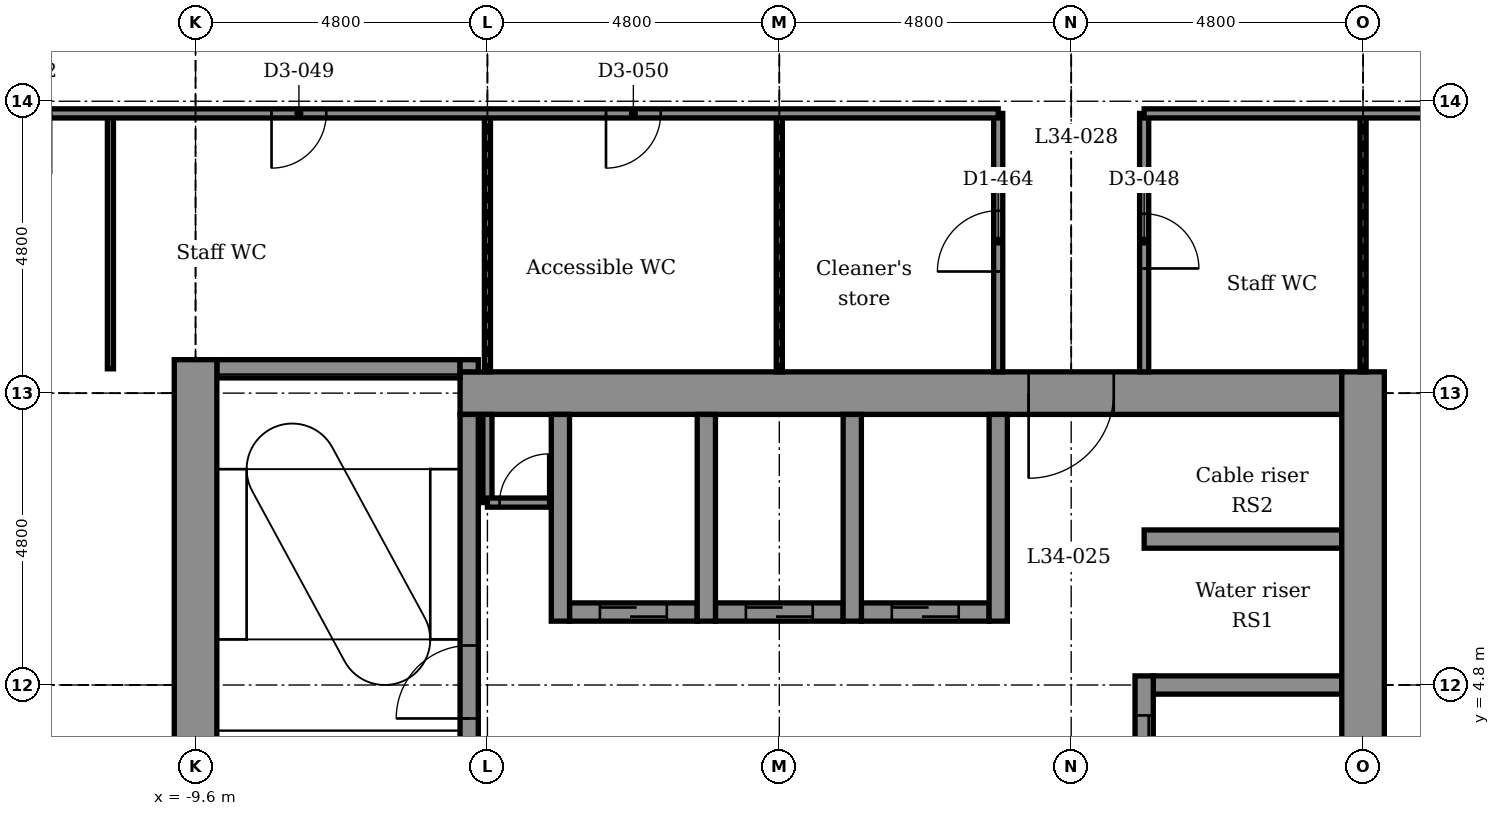
"""IFC4 building model, lengths in metres.
Left out: names, types, materials, properties, quantities, classifications, styles, units other than length and angle.
Written with IfcOpenShell. Run it as: python <this file> out.ifc"""

import sys

from ifc_helpers import new_model, si_unit, direction, frame, frame_2d, origin, place, context, subcontext, project, spatial, rectangle, extrude, element, fill, save


model = new_model("IFC4")
c1 = context("Model", 3, precision=1e-05, world=origin(), true_north=direction((0.0, 1.0)))
c2 = subcontext(c1, "Body", "Model", "MODEL_VIEW")
j1 = project(units=[si_unit("LENGTHUNIT", "METRE"), si_unit("PLANEANGLEUNIT", "RADIAN")], contexts=[c1])
p1 = place(None, origin())
s1 = spatial("IfcSite", under=j1, at=p1, CompositionType="ELEMENT")
p2 = place(p1, origin())
s2 = spatial("IfcBuilding", under=s1, at=p2, CompositionType="ELEMENT")
p3 = place(p2, frame((0.0, 0.0, 166.1)))
s3 = spatial("IfcBuildingStorey", under=s2, at=p3, CompositionType="ELEMENT", Elevation=166.1)
p4 = place(p3, frame((6.15, 4.8, -0.15), z_axis=(0.0, 0.0, 1.0), x_axis=(1.0, 0.0, 0.0)))
e1 = element("IfcWall", 1, at=p4, inside=s3, PredefinedType="STANDARD", context=c2, shape_type="SweptSolid", body=[
    extrude(rectangle(XDim=3.1, YDim=0.3, at=frame_2d((1.55, 0.0))), origin(), (0.0, 0.0, 1.0), 3.9),
])
p5 = place(p3, frame((-3.45, 6.0, -0.15), z_axis=(0.0, 0.0, 1.0), x_axis=(1.0, 0.0, 0.0)))
e2 = element("IfcWall", 2, at=p5, inside=s3, PredefinedType="STANDARD", context=c2, shape_type="SweptSolid", body=[
    extrude(rectangle(XDim=2.1, YDim=0.3, at=frame_2d((1.05, 0.0))), origin(), (0.0, 0.0, 1.0), 3.9),
])
p6 = place(p5, frame((0.5, 0.0, 0.15)))
e3 = element("IfcOpeningElement", 3, at=p6, cuts=e2, PredefinedType="OPENING", context=c2, shape_type="SweptSolid", body=[
    extrude(rectangle(XDim=1.1, YDim=2.1, at=frame_2d((0.55, 1.05))), frame((0.0, 0.16, 0.0), z_axis=(0.0, -1.0, 0.0), x_axis=(1.0, 0.0, 0.0)), (0.0, 0.0, 1.0), 0.32),
])
p7 = place(p3, frame((-1.05, 6.0, -0.15), z_axis=(0.0, 0.0, 1.0), x_axis=(1.0, 0.0, 0.0)))
e4 = element("IfcWall", 4, at=p7, inside=s3, PredefinedType="STANDARD", context=c2, shape_type="SweptSolid", body=[
    extrude(rectangle(XDim=2.1, YDim=0.3, at=frame_2d((1.05, 0.0))), origin(), (0.0, 0.0, 1.0), 3.9),
])
p8 = place(p7, frame((0.5, 0.0, 0.15)))
e5 = element("IfcOpeningElement", 5, at=p8, cuts=e4, PredefinedType="OPENING", context=c2, shape_type="SweptSolid", body=[
    extrude(rectangle(XDim=1.1, YDim=2.1, at=frame_2d((0.55, 1.05))), frame((0.0, 0.16, 0.0), z_axis=(0.0, -1.0, 0.0), x_axis=(1.0, 0.0, 0.0)), (0.0, 0.0, 1.0), 0.32),
])
p9 = place(p3, frame((1.35, 6.0, -0.15), z_axis=(0.0, 0.0, 1.0), x_axis=(1.0, 0.0, 0.0)))
e6 = element("IfcWall", 6, at=p9, inside=s3, PredefinedType="STANDARD", context=c2, shape_type="SweptSolid", body=[
    extrude(rectangle(XDim=2.1, YDim=0.3, at=frame_2d((1.05, 0.0))), origin(), (0.0, 0.0, 1.0), 3.9),
])
p10 = place(p9, frame((0.5, 0.0, 0.15)))
e7 = element("IfcOpeningElement", 7, at=p10, cuts=e6, PredefinedType="OPENING", context=c2, shape_type="SweptSolid", body=[
    extrude(rectangle(XDim=1.1, YDim=2.1, at=frame_2d((0.55, 1.05))), frame((0.0, 0.16, 0.0), z_axis=(0.0, -1.0, 0.0), x_axis=(1.0, 0.0, 0.0)), (0.0, 0.0, 1.0), 0.32),
])
p11 = place(p3, frame((6.0, 7.2, -0.15), z_axis=(0.0, 0.0, 1.0), x_axis=(1.0, 0.0, 0.0)))
e8 = element("IfcWall", 8, at=p11, inside=s3, PredefinedType="STANDARD", context=c2, shape_type="SweptSolid", body=[
    extrude(rectangle(XDim=3.25, YDim=0.3, at=frame_2d((1.625, 0.0))), origin(), (0.0, 0.0, 1.0), 3.9),
])
p12 = place(p3, frame((-5.25, 9.6, -0.15), z_axis=(0.0, 0.0, 1.0), x_axis=(1.0, 0.0, 0.0)))
e9 = element("IfcWall", 9, at=p12, inside=s3, PredefinedType="SHEAR", context=c2, shape_type="SweptSolid", body=[
    extrude(rectangle(XDim=14.5, YDim=0.7, at=frame_2d((7.25, 0.0))), origin(), (0.0, 0.0, 1.0), 3.9),
])
p13 = place(p12, frame((9.35, 0.0, 0.15)))
e10 = element("IfcOpeningElement", 10, at=p13, cuts=e9, PredefinedType="OPENING", context=c2, shape_type="SweptSolid", body=[
    extrude(rectangle(XDim=1.4, YDim=2.1, at=frame_2d((0.7, 1.05))), frame((0.0, 0.36, 0.0), z_axis=(0.0, -1.0, 0.0), x_axis=(1.0, 0.0, 0.0)), (0.0, 0.0, 1.0), 0.72),
])
p14 = place(p3, frame((-9.25, 10.0, -0.15), z_axis=(0.0, 0.0, 1.0), x_axis=(1.0, 0.0, 0.0)))
e11 = element("IfcWall", 11, at=p14, inside=s3, PredefinedType="STANDARD", context=c2, shape_type="SweptSolid", body=[
    extrude(rectangle(XDim=4.0, YDim=0.3, at=frame_2d((2.0, 0.0))), origin(), (0.0, 0.0, 1.0), 3.9),
])
p15 = place(p3, frame((-9.6, 2.55, -0.15), z_axis=(0.0, 0.0, 1.0), x_axis=(0.0, 1.0, 0.0)))
e12 = element("IfcWall", 12, at=p15, inside=s3, PredefinedType="SHEAR", context=c2, shape_type="SweptSolid", body=[
    extrude(rectangle(XDim=7.6, YDim=0.7, at=frame_2d((3.8, 0.0))), origin(), (0.0, 0.0, 1.0), 3.9),
])
p16 = place(p3, frame((-5.1, 2.25, -0.15), z_axis=(0.0, 0.0, 1.0), x_axis=(0.0, 1.0, 0.0)))
e13 = element("IfcWall", 13, at=p16, inside=s3, PredefinedType="STANDARD", context=c2, shape_type="SweptSolid", body=[
    extrude(rectangle(XDim=7.0, YDim=0.3, at=frame_2d((3.5, 0.0))), origin(), (0.0, 0.0, 1.0), 3.9),
])
p17 = place(p16, frame((2.0, 0.0, 0.15)))
e14 = element("IfcOpeningElement", 14, at=p17, cuts=e13, PredefinedType="OPENING", context=c2, shape_type="SweptSolid", body=[
    extrude(rectangle(XDim=1.2, YDim=2.1, at=frame_2d((0.6, 1.05))), frame((0.0, 0.16, 0.0), z_axis=(0.0, -1.0, 0.0), x_axis=(1.0, 0.0, 0.0)), (0.0, 0.0, 1.0), 0.32),
])
p18 = place(p3, frame((-5.1, 9.95, -0.15), z_axis=(0.0, 0.0, 1.0), x_axis=(0.0, 1.0, 0.0)))
e15 = element("IfcWall", 15, at=p18, inside=s3, PredefinedType="STANDARD", context=c2, shape_type="SweptSolid", body=[
    extrude(rectangle(XDim=0.2, YDim=0.3, at=frame_2d((0.1, 0.0))), origin(), (0.0, 0.0, 1.0), 3.9),
])
for number, where, z_axis, x_axis in (
    (16, (-3.6, 5.85, -0.15), (0.0, 0.0, 1.0), (0.0, 1.0, 0.0)),
    (17, (-1.2, 5.85, -0.15), (0.0, 0.0, 1.0), (0.0, 1.0, 0.0)),
    (18, (1.2, 5.85, -0.15), (0.0, 0.0, 1.0), (0.0, 1.0, 0.0)),
    (19, (3.6, 5.85, -0.15), (0.0, 0.0, 1.0), (0.0, 1.0, 0.0)),
):
    element("IfcWall", number, at=place(p3, frame(where, z_axis=z_axis, x_axis=x_axis)), inside=s3, PredefinedType="STANDARD", context=c2, shape_type="SweptSolid", body=[
        extrude(rectangle(XDim=3.4, YDim=0.3, at=frame_2d((1.7, 0.0))), origin(), (0.0, 0.0, 1.0), 3.9),
    ])
p19 = place(p3, frame((6.0, -2.55, -0.15), z_axis=(0.0, 0.0, 1.0), x_axis=(0.0, 1.0, 0.0)))
e20 = element("IfcWall", 20, at=p19, inside=s3, PredefinedType="STANDARD", context=c2, shape_type="SweptSolid", body=[
    extrude(rectangle(XDim=7.5, YDim=0.3, at=frame_2d((3.75, 0.0))), origin(), (0.0, 0.0, 1.0), 3.9),
])
p20 = place(p19, frame((0.65, 0.0, 0.15)))
e21 = element("IfcOpeningElement", 21, at=p20, cuts=e20, PredefinedType="OPENING", context=c2, shape_type="SweptSolid", body=[
    extrude(rectangle(XDim=1.4, YDim=2.1, at=frame_2d((0.7, 1.05))), frame((0.0, 0.16, 0.0), z_axis=(0.0, -1.0, 0.0), x_axis=(1.0, 0.0, 0.0)), (0.0, 0.0, 1.0), 0.32),
])
p21 = place(p19, frame((3.05, 0.0, 0.15)))
e22 = element("IfcOpeningElement", 22, at=p21, cuts=e20, PredefinedType="OPENING", context=c2, shape_type="SweptSolid", body=[
    extrude(rectangle(XDim=1.4, YDim=2.1, at=frame_2d((0.7, 1.05))), frame((0.0, 0.16, 0.0), z_axis=(0.0, -1.0, 0.0), x_axis=(1.0, 0.0, 0.0)), (0.0, 0.0, 1.0), 0.32),
])
p22 = place(p19, frame((5.45, 0.0, 0.15)))
e23 = element("IfcOpeningElement", 23, at=p22, cuts=e20, PredefinedType="OPENING", context=c2, shape_type="SweptSolid", body=[
    extrude(rectangle(XDim=1.4, YDim=2.1, at=frame_2d((0.7, 1.05))), frame((0.0, 0.16, 0.0), z_axis=(0.0, -1.0, 0.0), x_axis=(1.0, 0.0, 0.0)), (0.0, 0.0, 1.0), 0.32),
])
p23 = place(p3, frame((9.6, -10.15, -0.15), z_axis=(0.0, 0.0, 1.0), x_axis=(0.0, 1.0, 0.0)))
e24 = element("IfcWall", 24, at=p23, inside=s3, PredefinedType="SHEAR", context=c2, shape_type="SweptSolid", body=[
    extrude(rectangle(XDim=20.1, YDim=0.7, at=frame_2d((10.05, 0.0))), origin(), (0.0, 0.0, 1.0), 3.9),
])
p24 = place(p3, frame((9.6, 9.95, 0.0), z_axis=(0.0, 0.0, 1.0), x_axis=(0.0, 1.0, 0.0)))
e25 = element("IfcWall", 25, at=p24, inside=s3, PredefinedType="PARTITIONING", context=c2, shape_type="SweptSolid", body=[
    extrude(rectangle(XDim=4.25, YDim=0.1, at=frame_2d((2.125, 0.0))), origin(), (0.0, 0.0, 1.0), 3.066),
])
p25 = place(p3, frame((6.0, 9.95, 0.0), z_axis=(0.0, 0.0, 1.0), x_axis=(0.0, 1.0, 0.0)))
e26 = element("IfcWall", 26, at=p25, inside=s3, PredefinedType="PARTITIONING", context=c2, shape_type="SweptSolid", body=[
    extrude(rectangle(XDim=4.25, YDim=0.15, at=frame_2d((2.125, 0.0))), origin(), (0.0, 0.0, 1.0), 3.75),
])
p26 = place(p25, frame((1.7, 0.0, 0.0)))
e27 = element("IfcOpeningElement", 27, at=p26, cuts=e26, PredefinedType="OPENING", context=c2, shape_type="SweptSolid", body=[
    extrude(rectangle(XDim=0.9, YDim=2.1, at=frame_2d((0.45, 1.05))), frame((0.0, 0.085, 0.0), z_axis=(0.0, -1.0, 0.0), x_axis=(1.0, 0.0, 0.0)), (0.0, 0.0, 1.0), 0.17),
])
p27 = place(p3, frame((3.6, 9.95, 0.0), z_axis=(0.0, 0.0, 1.0), x_axis=(0.0, 1.0, 0.0)))
e28 = element("IfcWall", 28, at=p27, inside=s3, PredefinedType="PARTITIONING", context=c2, shape_type="SweptSolid", body=[
    extrude(rectangle(XDim=4.25, YDim=0.15, at=frame_2d((2.125, 0.0))), origin(), (0.0, 0.0, 1.0), 3.75),
])
p28 = place(p27, frame((1.65, 0.0, 0.0)))
e29 = element("IfcOpeningElement", 29, at=p28, cuts=e28, PredefinedType="OPENING", context=c2, shape_type="SweptSolid", body=[
    extrude(rectangle(XDim=1.0, YDim=2.1, at=frame_2d((0.5, 1.05))), frame((0.0, 0.085, 0.0), z_axis=(0.0, -1.0, 0.0), x_axis=(1.0, 0.0, 0.0)), (0.0, 0.0, 1.0), 0.17),
])
for number, where, z_axis, x_axis in (
    (30, (0.0, 9.95, 0.0), (0.0, 0.0, 1.0), (0.0, 1.0, 0.0)),
    (31, (-4.8, 9.95, 0.0), (0.0, 0.0, 1.0), (0.0, 1.0, 0.0)),
):
    element("IfcWall", number, at=place(p3, frame(where, z_axis=z_axis, x_axis=x_axis)), inside=s3, PredefinedType="PARTITIONING", context=c2, shape_type="SweptSolid", body=[
        extrude(rectangle(XDim=4.25, YDim=0.1, at=frame_2d((2.125, 0.0))), origin(), (0.0, 0.0, 1.0), 3.066),
    ])
p29 = place(p3, frame((-4.8, 7.8, 0.0), z_axis=(0.0, 0.0, 1.0), x_axis=(0.0, 1.0, 0.0)))
e32 = element("IfcWall", 32, at=p29, inside=s3, PredefinedType="PARTITIONING", context=c2, shape_type="SweptSolid", body=[
    extrude(rectangle(XDim=1.45, YDim=0.15, at=frame_2d((0.725, 0.0))), origin(), (0.0, 0.0, 1.0), 3.75),
])
p30 = place(p3, frame((-11.0, 10.0, 0.0), z_axis=(0.0, 0.0, 1.0), x_axis=(0.0, 1.0, 0.0)))
e33 = element("IfcWall", 33, at=p30, inside=s3, PredefinedType="PARTITIONING", context=c2, shape_type="SweptSolid", body=[
    extrude(rectangle(XDim=4.2, YDim=0.1, at=frame_2d((2.1, 0.0))), origin(), (0.0, 0.0, 1.0), 3.75),
])
p31 = place(p3, frame((-4.8, 7.8, 0.0), z_axis=(0.0, 0.0, 1.0), x_axis=(1.0, 0.0, 0.0)))
e34 = element("IfcWall", 34, at=p31, inside=s3, PredefinedType="PARTITIONING", context=c2, shape_type="SweptSolid", body=[
    extrude(rectangle(XDim=1.05, YDim=0.15, at=frame_2d((0.525, 0.0))), origin(), (0.0, 0.0, 1.0), 3.75),
])
p32 = place(p31, frame((0.2, 0.0, 0.0)))
e35 = element("IfcOpeningElement", 35, at=p32, cuts=e34, PredefinedType="OPENING", context=c2, shape_type="SweptSolid", body=[
    extrude(rectangle(XDim=0.8, YDim=2.1, at=frame_2d((0.4, 1.05))), frame((0.0, 0.085, 0.0), z_axis=(0.0, -1.0, 0.0), x_axis=(1.0, 0.0, 0.0)), (0.0, 0.0, 1.0), 0.17),
])
p33 = place(p3, frame((-18.731, 14.2, 0.0), z_axis=(0.0, 0.0, 1.0), x_axis=(1.0, 0.0, 0.0)))
e36 = element("IfcWall", 36, at=p33, inside=s3, PredefinedType="PARTITIONING", context=c2, shape_type="SweptSolid", body=[
    extrude(rectangle(XDim=22.331, YDim=0.15, at=frame_2d((11.166, 0.0))), origin(), (0.0, 0.0, 1.0), 3.75),
])
p34 = place(p33, frame((10.381, 0.0, 0.0)))
e37 = element("IfcOpeningElement", 37, at=p34, cuts=e36, PredefinedType="OPENING", context=c2, shape_type="SweptSolid", body=[
    extrude(rectangle(XDim=0.9, YDim=2.1, at=frame_2d((0.45, 1.05))), frame((0.0, 0.085, 0.0), z_axis=(0.0, -1.0, 0.0), x_axis=(1.0, 0.0, 0.0)), (0.0, 0.0, 1.0), 0.17),
])
p35 = place(p33, frame((15.881, 0.0, 0.0)))
e38 = element("IfcOpeningElement", 38, at=p35, cuts=e36, PredefinedType="OPENING", context=c2, shape_type="SweptSolid", body=[
    extrude(rectangle(XDim=0.9, YDim=2.1, at=frame_2d((0.45, 1.05))), frame((0.0, 0.085, 0.0), z_axis=(0.0, -1.0, 0.0), x_axis=(1.0, 0.0, 0.0)), (0.0, 0.0, 1.0), 0.17),
])
p36 = place(p33, frame((5.756, 0.0, 0.0)))
e39 = element("IfcOpeningElement", 39, at=p36, cuts=e36, PredefinedType="OPENING", context=c2, shape_type="SweptSolid", body=[
    extrude(rectangle(XDim=1.0, YDim=2.1, at=frame_2d((0.5, 1.05))), frame((0.0, 0.085, 0.0), z_axis=(0.0, -1.0, 0.0), x_axis=(1.0, 0.0, 0.0)), (0.0, 0.0, 1.0), 0.17),
])
p37 = place(p3, frame((6.0, 14.2, 0.0), z_axis=(0.0, 0.0, 1.0), x_axis=(1.0, 0.0, 0.0)))
e40 = element("IfcWall", 40, at=p37, inside=s3, PredefinedType="PARTITIONING", context=c2, shape_type="SweptSolid", body=[
    extrude(rectangle(XDim=10.93, YDim=0.15, at=frame_2d((5.465, 0.0))), origin(), (0.0, 0.0, 1.0), 3.75),
])
p38 = place(p32, origin())
e41 = element("IfcDoor", 41, at=p38, inside=s3, OperationType="SINGLE_SWING_RIGHT", PredefinedType="DOOR", context=c2, shape_type="SweptSolid", body=[
    extrude(rectangle(XDim=0.8, YDim=2.1, at=frame_2d((0.4, 1.05))), frame((0.0, 0.025, 0.0), z_axis=(0.0, -1.0, 0.0), x_axis=(1.0, 0.0, 0.0)), (0.0, 0.0, 1.0), 0.05),
])
fill(e35, e41)
p39 = place(p26, frame((0.9, 0.0, 0.0), z_axis=(0.0, 0.0, 1.0), x_axis=(-1.0, 0.0, 0.0)))
e42 = element("IfcDoor", 42, at=p39, inside=s3, OperationType="SINGLE_SWING_LEFT", PredefinedType="DOOR", context=c2, shape_type="SweptSolid", body=[
    extrude(rectangle(XDim=0.9, YDim=2.1, at=frame_2d((0.45, 1.05))), frame((0.0, 0.025, 0.0), z_axis=(0.0, -1.0, 0.0), x_axis=(1.0, 0.0, 0.0)), (0.0, 0.0, 1.0), 0.05),
])
fill(e27, e42)
p40 = place(p34, frame((0.9, 0.0, 0.0), z_axis=(0.0, 0.0, 1.0), x_axis=(-1.0, 0.0, 0.0)))
e43 = element("IfcDoor", 43, at=p40, inside=s3, OperationType="SINGLE_SWING_LEFT", PredefinedType="DOOR", context=c2, shape_type="SweptSolid", body=[
    extrude(rectangle(XDim=0.9, YDim=2.1, at=frame_2d((0.45, 1.05))), frame((0.0, 0.025, 0.0), z_axis=(0.0, -1.0, 0.0), x_axis=(1.0, 0.0, 0.0)), (0.0, 0.0, 1.0), 0.05),
])
fill(e37, e43)
p41 = place(p35, frame((0.9, 0.0, 0.0), z_axis=(0.0, 0.0, 1.0), x_axis=(-1.0, 0.0, 0.0)))
e44 = element("IfcDoor", 44, at=p41, inside=s3, OperationType="SINGLE_SWING_LEFT", PredefinedType="DOOR", context=c2, shape_type="SweptSolid", body=[
    extrude(rectangle(XDim=0.9, YDim=2.1, at=frame_2d((0.45, 1.05))), frame((0.0, 0.025, 0.0), z_axis=(0.0, -1.0, 0.0), x_axis=(1.0, 0.0, 0.0)), (0.0, 0.0, 1.0), 0.05),
])
fill(e38, e44)
p42 = place(p28, origin())
e45 = element("IfcDoor", 45, at=p42, inside=s3, OperationType="SINGLE_SWING_LEFT", PredefinedType="DOOR", context=c2, shape_type="SweptSolid", body=[
    extrude(rectangle(XDim=1.0, YDim=2.1, at=frame_2d((0.5, 1.05))), frame((0.0, 0.025, 0.0), z_axis=(0.0, -1.0, 0.0), x_axis=(1.0, 0.0, 0.0)), (0.0, 0.0, 1.0), 0.05),
])
fill(e29, e45)
p43 = place(p22, origin())
e46 = element("IfcDoor", 46, at=p43, inside=s3, OperationType="DOUBLE_DOOR_SLIDING", PredefinedType="DOOR", context=c2, shape_type="SweptSolid", body=[
    extrude(rectangle(XDim=1.4, YDim=2.1, at=frame_2d((0.7, 1.05))), frame((0.0, 0.025, 0.0), z_axis=(0.0, -1.0, 0.0), x_axis=(1.0, 0.0, 0.0)), (0.0, 0.0, 1.0), 0.05),
])
fill(e23, e46)
p44 = place(p6, origin())
e47 = element("IfcDoor", 47, at=p44, inside=s3, OperationType="DOUBLE_DOOR_SLIDING", PredefinedType="DOOR", context=c2, shape_type="SweptSolid", body=[
    extrude(rectangle(XDim=1.1, YDim=2.1, at=frame_2d((0.55, 1.05))), frame((0.0, 0.025, 0.0), z_axis=(0.0, -1.0, 0.0), x_axis=(1.0, 0.0, 0.0)), (0.0, 0.0, 1.0), 0.05),
])
fill(e3, e47)
p45 = place(p8, origin())
e48 = element("IfcDoor", 48, at=p45, inside=s3, OperationType="DOUBLE_DOOR_SLIDING", PredefinedType="DOOR", context=c2, shape_type="SweptSolid", body=[
    extrude(rectangle(XDim=1.1, YDim=2.1, at=frame_2d((0.55, 1.05))), frame((0.0, 0.025, 0.0), z_axis=(0.0, -1.0, 0.0), x_axis=(1.0, 0.0, 0.0)), (0.0, 0.0, 1.0), 0.05),
])
fill(e5, e48)
p46 = place(p10, origin())
e49 = element("IfcDoor", 49, at=p46, inside=s3, OperationType="DOUBLE_DOOR_SLIDING", PredefinedType="DOOR", context=c2, shape_type="SweptSolid", body=[
    extrude(rectangle(XDim=1.1, YDim=2.1, at=frame_2d((0.55, 1.05))), frame((0.0, 0.025, 0.0), z_axis=(0.0, -1.0, 0.0), x_axis=(1.0, 0.0, 0.0)), (0.0, 0.0, 1.0), 0.05),
])
fill(e7, e49)
p47 = place(p17, origin())
e50 = element("IfcDoor", 50, at=p47, inside=s3, OperationType="SINGLE_SWING_LEFT", PredefinedType="DOOR", context=c2, shape_type="SweptSolid", body=[
    extrude(rectangle(XDim=1.2, YDim=2.1, at=frame_2d((0.6, 1.05))), frame((0.0, 0.025, 0.0), z_axis=(0.0, -1.0, 0.0), x_axis=(1.0, 0.0, 0.0)), (0.0, 0.0, 1.0), 0.05),
])
fill(e14, e50)
p48 = place(p13, frame((1.4, 0.0, 0.0), z_axis=(0.0, 0.0, 1.0), x_axis=(-1.0, 0.0, 0.0)))
e51 = element("IfcDoor", 51, at=p48, inside=s3, OperationType="SINGLE_SWING_LEFT", PredefinedType="DOOR", context=c2, shape_type="SweptSolid", body=[
    extrude(rectangle(XDim=1.4, YDim=2.1, at=frame_2d((0.7, 1.05))), frame((0.0, 0.025, 0.0), z_axis=(0.0, -1.0, 0.0), x_axis=(1.0, 0.0, 0.0)), (0.0, 0.0, 1.0), 0.05),
])
fill(e10, e51)
save(model, sys.argv[1])
